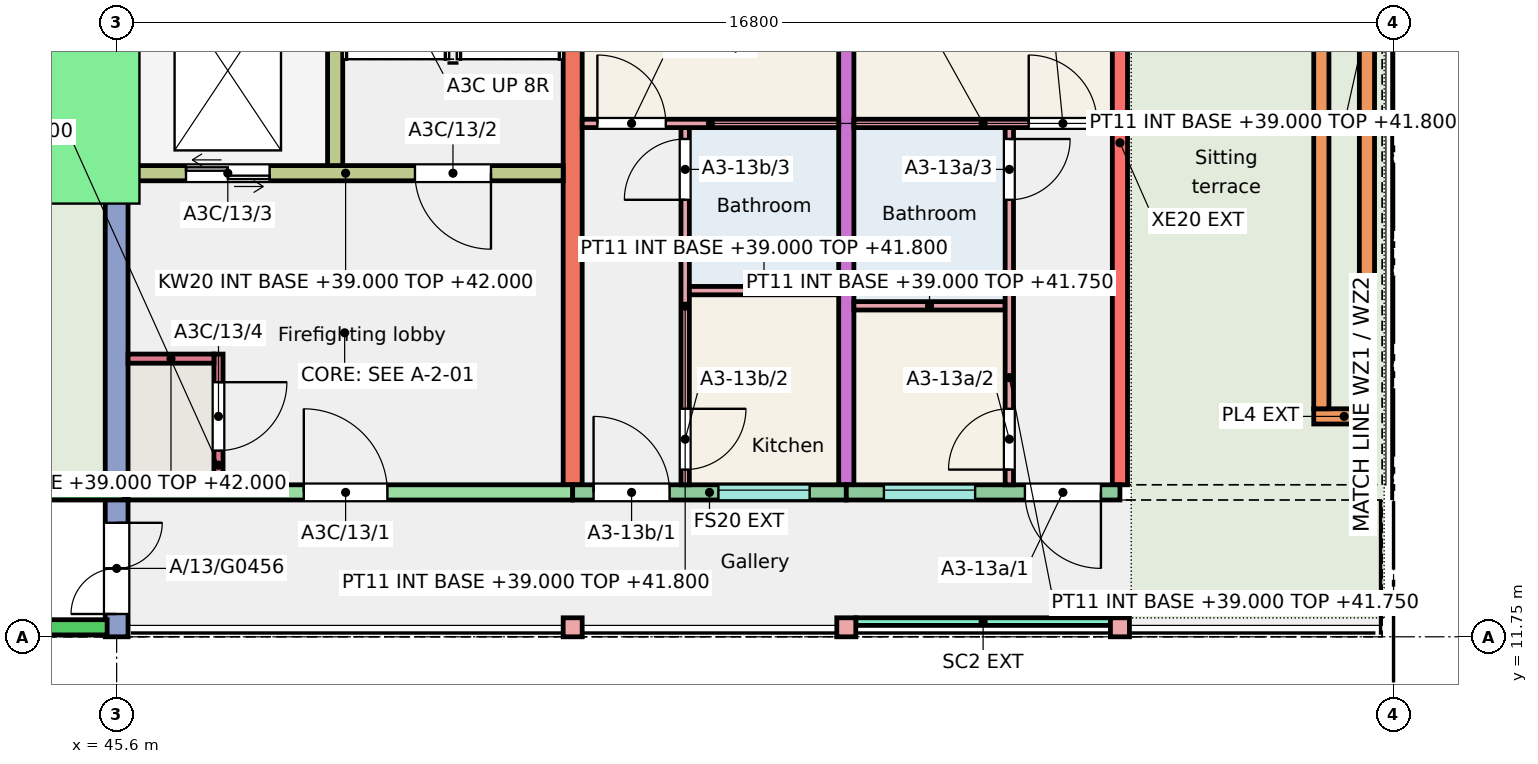
"""IFC4 building model, lengths in metres.
Left out: names, types, materials, properties, quantities, classifications, styles, units other than length and angle.
Written with IfcOpenShell. Run it as: python <this file> out.ifc"""

import sys

from ifc_helpers import new_model, si_unit, direction, frame, frame_2d, origin, origin_2d, place, context, subcontext, project, spatial, rectangle, extrude, element, fill, save


model = new_model("IFC4")
c1 = context("Model", 3, precision=1e-05, world=origin(), true_north=direction((0.0, 1.0)))
c2 = subcontext(c1, "Body", "Model", "MODEL_VIEW")
j1 = project(units=[si_unit("LENGTHUNIT", "METRE"), si_unit("PLANEANGLEUNIT", "RADIAN")], contexts=[c1])
p1 = place(None, origin())
s1 = spatial("IfcSite", under=j1, at=p1, CompositionType="ELEMENT")
p2 = place(p1, origin())
s2 = spatial("IfcBuilding", under=s1, at=p2, CompositionType="ELEMENT")
p3 = place(p2, frame((0.0, 0.0, 39.0)))
s3 = spatial("IfcBuildingStorey", under=s2, at=p3, CompositionType="ELEMENT", Elevation=39.0)
p4 = place(p3, frame((45.6, 11.75, 0.0), z_axis=(0.0, 0.0, 1.0), x_axis=(0.0, 1.0, 0.0)))
e1 = element("IfcWall", 1, at=p4, inside=s3, PredefinedType="SHEAR", context=c2, shape_type="SweptSolid", body=[
    extrude(rectangle(XDim=11.0, YDim=0.3, at=frame_2d((5.5, 0.0))), origin(), (0.0, 0.0, 1.0), 3.0),
])
p5 = place(p4, frame((0.3, 0.0, 0.0)))
e2 = element("IfcOpeningElement", 2, at=p5, cuts=e1, PredefinedType="OPENING", context=c2, shape_type="SweptSolid", body=[
    extrude(rectangle(XDim=1.2, YDim=2.1, at=frame_2d((0.6, 1.05))), frame((0.0, 0.16, 0.0), z_axis=(0.0, -1.0, 0.0), x_axis=(1.0, 0.0, 0.0)), (0.0, 0.0, 1.0), 0.32),
])
p6 = place(p3, frame((51.6, 13.75, 0.0), z_axis=(0.0, 0.0, 1.0), x_axis=(0.0, 1.0, 0.0)))
e3 = element("IfcWall", 3, at=p6, inside=s3, PredefinedType="SHEAR", context=c2, shape_type="SweptSolid", body=[
    extrude(rectangle(XDim=9.0, YDim=0.25, at=frame_2d((4.5, 0.0))), origin(), (0.0, 0.0, 1.0), 3.0),
])
p7 = place(p3, frame((55.2, 13.75, 0.0), z_axis=(0.0, 0.0, 1.0), x_axis=(0.0, 1.0, 0.0)))
e4 = element("IfcWall", 4, at=p7, inside=s3, PredefinedType="SHEAR", context=c2, shape_type="SweptSolid", body=[
    extrude(rectangle(XDim=9.0, YDim=0.2, at=frame_2d((4.5, 0.0))), origin(), (0.0, 0.0, 1.0), 3.0),
])
p8 = place(p3, frame((58.8, 13.75, 0.0), z_axis=(0.0, 0.0, 1.0), x_axis=(0.0, 1.0, 0.0)))
e5 = element("IfcWall", 5, at=p8, inside=s3, PredefinedType="SHEAR", context=c2, shape_type="SweptSolid", body=[
    extrude(rectangle(XDim=9.0, YDim=0.2, at=frame_2d((4.5, 0.0))), origin(), (0.0, 0.0, 1.0), 3.0),
])
p9 = place(p8, frame((7.653, 0.0, 0.9)))
e6 = element("IfcOpeningElement", 6, at=p9, cuts=e5, PredefinedType="OPENING", context=c2, shape_type="SweptSolid", body=[
    extrude(rectangle(XDim=1.2, YDim=1.5, at=frame_2d((0.6, 0.75))), frame((0.0, 0.11, 0.0), z_axis=(0.0, -1.0, 0.0), x_axis=(1.0, 0.0, 0.0)), (0.0, 0.0, 1.0), 0.22),
])
p10 = place(p8, frame((6.405, 0.0, 0.0)))
e7 = element("IfcOpeningElement", 7, at=p10, cuts=e5, PredefinedType="OPENING", context=c2, shape_type="SweptSolid", body=[
    extrude(rectangle(XDim=1.0, YDim=2.1, at=frame_2d((0.5, 1.05))), frame((0.0, 0.11, 0.0), z_axis=(0.0, -1.0, 0.0), x_axis=(1.0, 0.0, 0.0)), (0.0, 0.0, 1.0), 0.22),
])
p11 = place(p3, frame((45.75, 13.65, 0.0), z_axis=(0.0, 0.0, 1.0), x_axis=(1.0, 0.0, 0.0)))
e8 = element("IfcWall", 8, at=p11, inside=s3, PredefinedType="SHEAR", context=c2, shape_type="SweptSolid", body=[
    extrude(rectangle(XDim=5.85, YDim=0.2, at=frame_2d((2.925, 0.0))), origin(), (0.0, 0.0, 1.0), 3.0),
])
p12 = place(p11, frame((2.312, 0.0, 0.0)))
e9 = element("IfcOpeningElement", 9, at=p12, cuts=e8, PredefinedType="OPENING", context=c2, shape_type="SweptSolid", body=[
    extrude(rectangle(XDim=1.1, YDim=2.1, at=frame_2d((0.55, 1.05))), frame((0.0, 0.11, 0.0), z_axis=(0.0, -1.0, 0.0), x_axis=(1.0, 0.0, 0.0)), (0.0, 0.0, 1.0), 0.22),
])
p13 = place(p3, frame((45.75, 17.85, 0.0), z_axis=(0.0, 0.0, 1.0), x_axis=(1.0, 0.0, 0.0)))
e10 = element("IfcWall", 10, at=p13, inside=s3, PredefinedType="SHEAR", context=c2, shape_type="SweptSolid", body=[
    extrude(rectangle(XDim=5.725, YDim=0.2, at=frame_2d((2.863, 0.0))), origin(), (0.0, 0.0, 1.0), 3.0),
])
p14 = place(p13, frame((3.775, 0.0, 0.0)))
e11 = element("IfcOpeningElement", 11, at=p14, cuts=e10, PredefinedType="OPENING", context=c2, shape_type="SweptSolid", body=[
    extrude(rectangle(XDim=1.0, YDim=2.1, at=frame_2d((0.5, 1.05))), frame((0.0, 0.11, 0.0), z_axis=(0.0, -1.0, 0.0), x_axis=(1.0, 0.0, 0.0)), (0.0, 0.0, 1.0), 0.22),
])
p15 = place(p13, frame((0.762, 0.0, 0.0)))
e12 = element("IfcOpeningElement", 12, at=p15, cuts=e10, PredefinedType="OPENING", context=c2, shape_type="SweptSolid", body=[
    extrude(rectangle(XDim=1.1, YDim=2.1, at=frame_2d((0.55, 1.05))), frame((0.0, 0.11, 0.0), z_axis=(0.0, -1.0, 0.0), x_axis=(1.0, 0.0, 0.0)), (0.0, 0.0, 1.0), 0.22),
])
p16 = place(p3, frame((48.475, 17.95, 0.0), z_axis=(0.0, 0.0, 1.0), x_axis=(0.0, 1.0, 0.0)))
e13 = element("IfcWall", 13, at=p16, inside=s3, PredefinedType="SHEAR", context=c2, shape_type="SweptSolid", body=[
    extrude(rectangle(XDim=4.8, YDim=0.2, at=frame_2d((2.4, 0.0))), origin(), (0.0, 0.0, 1.0), 3.0),
])
p17 = place(p3, frame((46.94, 13.75, 0.0), z_axis=(0.0, 0.0, 1.0), x_axis=(0.0, 1.0, 0.0)))
e14 = element("IfcWall", 14, at=p17, inside=s3, PredefinedType="SHEAR", context=c2, shape_type="SweptSolid", body=[
    extrude(rectangle(XDim=1.72, YDim=0.12, at=frame_2d((0.86, 0.0))), origin(), (0.0, 0.0, 1.0), 3.0),
])
p18 = place(p17, frame((0.45, 0.0, 0.0)))
e15 = element("IfcOpeningElement", 15, at=p18, cuts=e14, PredefinedType="OPENING", context=c2, shape_type="SweptSolid", body=[
    extrude(rectangle(XDim=0.9, YDim=2.1, at=frame_2d((0.45, 1.05))), frame((0.0, 0.07, 0.0), z_axis=(0.0, -1.0, 0.0), x_axis=(1.0, 0.0, 0.0)), (0.0, 0.0, 1.0), 0.14),
])
p19 = place(p3, frame((45.75, 15.41, 0.0), z_axis=(0.0, 0.0, 1.0), x_axis=(1.0, 0.0, 0.0)))
e16 = element("IfcWall", 16, at=p19, inside=s3, PredefinedType="SHEAR", context=c2, shape_type="SweptSolid", body=[
    extrude(rectangle(XDim=1.13, YDim=0.12, at=frame_2d((0.565, 0.0))), origin(), (0.0, 0.0, 1.0), 3.0),
])
p20 = place(p3, frame((51.6, 13.65, 0.0), z_axis=(0.0, 0.0, 1.0), x_axis=(1.0, 0.0, 0.0)))
e17 = element("IfcWall", 17, at=p20, inside=s3, PredefinedType="SOLIDWALL", context=c2, shape_type="SweptSolid", body=[
    extrude(rectangle(XDim=3.6, YDim=0.2, at=frame_2d((1.8, 0.0))), origin(), (0.0, 0.0, 1.0), 3.0),
])
p21 = place(p20, frame((1.917, 0.0, 1.1)))
e18 = element("IfcOpeningElement", 18, at=p21, cuts=e17, PredefinedType="OPENING", context=c2, shape_type="SweptSolid", body=[
    extrude(rectangle(XDim=1.2, YDim=1.3, at=frame_2d((0.6, 0.65))), frame((0.0, 0.11, 0.0), z_axis=(0.0, -1.0, 0.0), x_axis=(1.0, 0.0, 0.0)), (0.0, 0.0, 1.0), 0.22),
])
p22 = place(p20, frame((0.275, 0.0, 0.0)))
e19 = element("IfcOpeningElement", 19, at=p22, cuts=e17, PredefinedType="OPENING", context=c2, shape_type="SweptSolid", body=[
    extrude(rectangle(XDim=1.0, YDim=2.1, at=frame_2d((0.5, 1.05))), frame((0.0, 0.11, 0.0), z_axis=(0.0, -1.0, 0.0), x_axis=(1.0, 0.0, 0.0)), (0.0, 0.0, 1.0), 0.22),
])
p23 = place(p3, frame((55.2, 13.65, 0.0), z_axis=(0.0, 0.0, 1.0), x_axis=(1.0, 0.0, 0.0)))
e20 = element("IfcWall", 20, at=p23, inside=s3, PredefinedType="SOLIDWALL", context=c2, shape_type="SweptSolid", body=[
    extrude(rectangle(XDim=3.6, YDim=0.2, at=frame_2d((1.8, 0.0))), origin(), (0.0, 0.0, 1.0), 3.0),
])
p24 = place(p23, frame((0.495, 0.0, 1.1)))
e21 = element("IfcOpeningElement", 21, at=p24, cuts=e20, PredefinedType="OPENING", context=c2, shape_type="SweptSolid", body=[
    extrude(rectangle(XDim=1.2, YDim=1.3, at=frame_2d((0.6, 0.65))), frame((0.0, 0.11, 0.0), z_axis=(0.0, -1.0, 0.0), x_axis=(1.0, 0.0, 0.0)), (0.0, 0.0, 1.0), 0.22),
])
p25 = place(p23, frame((2.35, 0.0, 0.0)))
e22 = element("IfcOpeningElement", 22, at=p25, cuts=e20, PredefinedType="OPENING", context=c2, shape_type="SweptSolid", body=[
    extrude(rectangle(XDim=1.0, YDim=2.1, at=frame_2d((0.5, 1.05))), frame((0.0, 0.11, 0.0), z_axis=(0.0, -1.0, 0.0), x_axis=(1.0, 0.0, 0.0)), (0.0, 0.0, 1.0), 0.22),
])
for number, where, z_axis, x_axis in (
    (23, (51.6, 11.875, 0.0), (0.0, 0.0, 1.0), (1.0, 0.0, 0.0)),
    (24, (55.2, 11.875, 0.0), (0.0, 0.0, 1.0), (1.0, 0.0, 0.0)),
    (25, (58.8, 11.875, 0.0), (0.0, 0.0, 1.0), (1.0, 0.0, 0.0)),
):
    element("IfcColumn", number, at=place(p3, frame(where, z_axis=z_axis, x_axis=x_axis)), inside=s3, PredefinedType="COLUMN", context=c2, shape_type="SweptSolid", body=[
        extrude(rectangle(XDim=0.25, YDim=0.25, at=origin_2d()), origin(), (0.0, 0.0, 1.0), 3.0),
    ])
p26 = place(p3, frame((42.625, 17.85, 0.0), z_axis=(0.0, 0.0, 1.0), x_axis=(1.0, 0.0, 0.0)))
e26 = element("IfcWall", 26, at=p26, inside=s3, PredefinedType="SHEAR", context=c2, shape_type="SweptSolid", body=[
    extrude(rectangle(XDim=2.825, YDim=0.2, at=frame_2d((1.413, 0.0))), origin(), (0.0, 0.0, 1.0), 1.5),
])
p27 = place(p3, frame((39.5, 13.65, 0.0), z_axis=(0.0, 0.0, 1.0), x_axis=(1.0, 0.0, 0.0)))
e27 = element("IfcWall", 27, at=p27, inside=s3, PredefinedType="PARAPET", context=c2, shape_type="SweptSolid", body=[
    extrude(rectangle(XDim=6.2, YDim=0.2, at=frame_2d((3.1, 0.0))), origin(), (0.0, 0.0, 1.0), 1.1),
])
p28 = place(p3, frame((39.725, 11.875, 0.0), z_axis=(0.0, 0.0, 1.0), x_axis=(1.0, 0.0, 0.0)))
e28 = element("IfcWall", 28, at=p28, inside=s3, PredefinedType="PARAPET", context=c2, shape_type="SweptSolid", body=[
    extrude(rectangle(XDim=5.75, YDim=0.2, at=frame_2d((2.875, 0.0))), origin(), (0.0, 0.0, 1.0), 1.1),
])
p29 = place(p3, frame((61.35, 14.65, 0.01), z_axis=(0.0, 0.0, 1.0), x_axis=(1.0, 0.0, 0.0)))
e29 = element("IfcWall", 29, at=p29, inside=s3, PredefinedType="SOLIDWALL", context=c2, shape_type="SweptSolid", body=[
    extrude(rectangle(XDim=0.8, YDim=0.2, at=frame_2d((0.4, 0.0))), origin(), (0.0, 0.0, 1.0), 0.45),
])
for number, where, z_axis, x_axis in (
    (30, (61.45, 14.75, 0.01), (0.0, 0.0, 1.0), (0.0, 1.0, 0.0)),
    (31, (62.05, 14.75, 0.01), (0.0, 0.0, 1.0), (0.0, 1.0, 0.0)),
):
    element("IfcWall", number, at=place(p3, frame(where, z_axis=z_axis, x_axis=x_axis)), inside=s3, PredefinedType="SOLIDWALL", context=c2, shape_type="SweptSolid", body=[
        extrude(rectangle(XDim=7.5, YDim=0.2, at=frame_2d((3.75, 0.0))), origin(), (0.0, 0.0, 1.0), 0.45),
    ])
p30 = place(p3, frame((55.325, 11.95, 0.0), z_axis=(0.0, 0.0, 1.0), x_axis=(1.0, 0.0, 0.0)))
e32 = element("IfcWall", 32, at=p30, inside=s3, PredefinedType="SOLIDWALL", context=c2, shape_type="SweptSolid", body=[
    extrude(rectangle(XDim=3.35, YDim=0.1, at=frame_2d((1.675, 0.0))), origin(), (0.0, 0.0, 1.0), 2.45),
])
p31 = place(p3, frame((55.3, 16.105, 0.0), z_axis=(0.0, 0.0, 1.0), x_axis=(1.0, 0.0, 0.0)))
e33 = element("IfcWall", 33, at=p31, inside=s3, PredefinedType="PARTITIONING", context=c2, shape_type="SweptSolid", body=[
    extrude(rectangle(XDim=1.99, YDim=0.11, at=frame_2d((0.995, 0.0))), origin(), (0.0, 0.0, 1.0), 2.75),
])
p32 = place(p3, frame((57.345, 13.75, 0.0), z_axis=(0.0, 0.0, 1.0), x_axis=(0.0, 1.0, 0.0)))
e34 = element("IfcWall", 34, at=p32, inside=s3, PredefinedType="PARTITIONING", context=c2, shape_type="SweptSolid", body=[
    extrude(rectangle(XDim=4.7, YDim=0.11, at=frame_2d((2.35, 0.0))), origin(), (0.0, 0.0, 1.0), 2.75),
])
p33 = place(p32, frame((0.2, 0.0, 0.0)))
e35 = element("IfcOpeningElement", 35, at=p33, cuts=e34, PredefinedType="OPENING", context=c2, shape_type="SweptSolid", body=[
    extrude(rectangle(XDim=0.8, YDim=2.1, at=frame_2d((0.4, 1.05))), frame((0.0, 0.065, 0.0), z_axis=(0.0, -1.0, 0.0), x_axis=(1.0, 0.0, 0.0)), (0.0, 0.0, 1.0), 0.13),
])
p34 = place(p32, frame((3.75, 0.0, 0.0)))
e36 = element("IfcOpeningElement", 36, at=p34, cuts=e34, PredefinedType="OPENING", context=c2, shape_type="SweptSolid", body=[
    extrude(rectangle(XDim=0.8, YDim=2.1, at=frame_2d((0.4, 1.05))), frame((0.0, 0.065, 0.0), z_axis=(0.0, -1.0, 0.0), x_axis=(1.0, 0.0, 0.0)), (0.0, 0.0, 1.0), 0.13),
])
p35 = place(p3, frame((55.3, 18.505, 0.0), z_axis=(0.0, 0.0, 1.0), x_axis=(1.0, 0.0, 0.0)))
e37 = element("IfcWall", 37, at=p35, inside=s3, PredefinedType="PARTITIONING", context=c2, shape_type="SweptSolid", body=[
    extrude(rectangle(XDim=3.4, YDim=0.11, at=frame_2d((1.7, 0.0))), origin(), (0.0, 0.0, 1.0), 2.75),
])
p36 = place(p35, frame((2.3, 0.0, 0.0)))
e38 = element("IfcOpeningElement", 38, at=p36, cuts=e37, PredefinedType="OPENING", context=c2, shape_type="SweptSolid", body=[
    extrude(rectangle(XDim=0.9, YDim=2.1, at=frame_2d((0.45, 1.05))), frame((0.0, 0.065, 0.0), z_axis=(0.0, -1.0, 0.0), x_axis=(1.0, 0.0, 0.0)), (0.0, 0.0, 1.0), 0.13),
])
p37 = place(p3, frame((53.08, 13.75, 0.0), z_axis=(0.0, 0.0, 1.0), x_axis=(0.0, 1.0, 0.0)))
e39 = element("IfcWall", 39, at=p37, inside=s3, PredefinedType="PARTITIONING", context=c2, shape_type="SweptSolid", body=[
    extrude(rectangle(XDim=4.7, YDim=0.11, at=frame_2d((2.35, 0.0))), origin(), (0.0, 0.0, 1.0), 2.8),
])
p38 = place(p37, frame((0.2, 0.0, 0.0)))
e40 = element("IfcOpeningElement", 40, at=p38, cuts=e39, PredefinedType="OPENING", context=c2, shape_type="SweptSolid", body=[
    extrude(rectangle(XDim=0.8, YDim=2.1, at=frame_2d((0.4, 1.05))), frame((0.0, 0.065, 0.0), z_axis=(0.0, -1.0, 0.0), x_axis=(1.0, 0.0, 0.0)), (0.0, 0.0, 1.0), 0.13),
])
p39 = place(p37, frame((3.75, 0.0, 0.0)))
e41 = element("IfcOpeningElement", 41, at=p39, cuts=e39, PredefinedType="OPENING", context=c2, shape_type="SweptSolid", body=[
    extrude(rectangle(XDim=0.8, YDim=2.1, at=frame_2d((0.4, 1.05))), frame((0.0, 0.065, 0.0), z_axis=(0.0, -1.0, 0.0), x_axis=(1.0, 0.0, 0.0)), (0.0, 0.0, 1.0), 0.13),
])
p40 = place(p3, frame((53.135, 16.305, 0.0), z_axis=(0.0, 0.0, 1.0), x_axis=(1.0, 0.0, 0.0)))
e42 = element("IfcWall", 42, at=p40, inside=s3, PredefinedType="PARTITIONING", context=c2, shape_type="SweptSolid", body=[
    extrude(rectangle(XDim=1.965, YDim=0.11, at=frame_2d((0.982, 0.0))), origin(), (0.0, 0.0, 1.0), 2.8),
])
p41 = place(p3, frame((51.725, 18.505, 0.0), z_axis=(0.0, 0.0, 1.0), x_axis=(1.0, 0.0, 0.0)))
e43 = element("IfcWall", 43, at=p41, inside=s3, PredefinedType="PARTITIONING", context=c2, shape_type="SweptSolid", body=[
    extrude(rectangle(XDim=3.375, YDim=0.11, at=frame_2d((1.688, 0.0))), origin(), (0.0, 0.0, 1.0), 2.8),
])
p42 = place(p41, frame((0.2, 0.0, 0.0)))
e44 = element("IfcOpeningElement", 44, at=p42, cuts=e43, PredefinedType="OPENING", context=c2, shape_type="SweptSolid", body=[
    extrude(rectangle(XDim=0.9, YDim=2.1, at=frame_2d((0.45, 1.05))), frame((0.0, 0.065, 0.0), z_axis=(0.0, -1.0, 0.0), x_axis=(1.0, 0.0, 0.0)), (0.0, 0.0, 1.0), 0.13),
])
p43 = place(p24, origin())
e45 = element("IfcWindow", 45, at=p43, inside=s3, PartitioningType="SINGLE_PANEL", PredefinedType="WINDOW", context=c2, shape_type="SweptSolid", body=[
    extrude(rectangle(XDim=1.2, YDim=1.3, at=frame_2d((0.6, 0.65))), frame((0.0, 0.06, 0.0), z_axis=(0.0, -1.0, 0.0), x_axis=(1.0, 0.0, 0.0)), (0.0, 0.0, 1.0), 0.06),
])
fill(e21, e45)
p44 = place(p21, origin())
e46 = element("IfcWindow", 46, at=p44, inside=s3, PartitioningType="SINGLE_PANEL", PredefinedType="WINDOW", context=c2, shape_type="SweptSolid", body=[
    extrude(rectangle(XDim=1.2, YDim=1.3, at=frame_2d((0.6, 0.65))), frame((0.0, 0.06, 0.0), z_axis=(0.0, -1.0, 0.0), x_axis=(1.0, 0.0, 0.0)), (0.0, 0.0, 1.0), 0.06),
])
fill(e18, e46)
p45 = place(p25, origin())
e47 = element("IfcDoor", 47, at=p45, inside=s3, OperationType="SINGLE_SWING_RIGHT", PredefinedType="DOOR", context=c2, shape_type="SweptSolid", body=[
    extrude(rectangle(XDim=1.0, YDim=2.1, at=frame_2d((0.5, 1.05))), frame((0.0, 0.025, 0.0), z_axis=(0.0, -1.0, 0.0), x_axis=(1.0, 0.0, 0.0)), (0.0, 0.0, 1.0), 0.05),
])
fill(e22, e47)
p46 = place(p33, origin())
e48 = element("IfcDoor", 48, at=p46, inside=s3, OperationType="SINGLE_SWING_LEFT", PredefinedType="DOOR", context=c2, shape_type="SweptSolid", body=[
    extrude(rectangle(XDim=0.8, YDim=2.1, at=frame_2d((0.4, 1.05))), frame((0.0, 0.025, 0.0), z_axis=(0.0, -1.0, 0.0), x_axis=(1.0, 0.0, 0.0)), (0.0, 0.0, 1.0), 0.05),
])
fill(e35, e48)
p47 = place(p34, origin())
e49 = element("IfcDoor", 49, at=p47, inside=s3, OperationType="SINGLE_SWING_RIGHT", PredefinedType="DOOR", context=c2, shape_type="SweptSolid", body=[
    extrude(rectangle(XDim=0.8, YDim=2.1, at=frame_2d((0.4, 1.05))), frame((0.0, 0.025, 0.0), z_axis=(0.0, -1.0, 0.0), x_axis=(1.0, 0.0, 0.0)), (0.0, 0.0, 1.0), 0.05),
])
fill(e36, e49)
p48 = place(p36, origin())
e50 = element("IfcDoor", 50, at=p48, inside=s3, OperationType="SINGLE_SWING_LEFT", PredefinedType="DOOR", context=c2, shape_type="SweptSolid", body=[
    extrude(rectangle(XDim=0.9, YDim=2.1, at=frame_2d((0.45, 1.05))), frame((0.0, 0.025, 0.0), z_axis=(0.0, -1.0, 0.0), x_axis=(1.0, 0.0, 0.0)), (0.0, 0.0, 1.0), 0.05),
])
fill(e38, e50)
p49 = place(p22, origin())
e51 = element("IfcDoor", 51, at=p49, inside=s3, OperationType="SINGLE_SWING_LEFT", PredefinedType="DOOR", context=c2, shape_type="SweptSolid", body=[
    extrude(rectangle(XDim=1.0, YDim=2.1, at=frame_2d((0.5, 1.05))), frame((0.0, 0.025, 0.0), z_axis=(0.0, -1.0, 0.0), x_axis=(1.0, 0.0, 0.0)), (0.0, 0.0, 1.0), 0.05),
])
fill(e19, e51)
p50 = place(p38, origin())
e52 = element("IfcDoor", 52, at=p50, inside=s3, OperationType="SINGLE_SWING_RIGHT", PredefinedType="DOOR", context=c2, shape_type="SweptSolid", body=[
    extrude(rectangle(XDim=0.8, YDim=2.1, at=frame_2d((0.4, 1.05))), frame((0.0, 0.025, 0.0), z_axis=(0.0, -1.0, 0.0), x_axis=(1.0, 0.0, 0.0)), (0.0, 0.0, 1.0), 0.05),
])
fill(e40, e52)
p51 = place(p39, origin())
e53 = element("IfcDoor", 53, at=p51, inside=s3, OperationType="SINGLE_SWING_LEFT", PredefinedType="DOOR", context=c2, shape_type="SweptSolid", body=[
    extrude(rectangle(XDim=0.8, YDim=2.1, at=frame_2d((0.4, 1.05))), frame((0.0, 0.025, 0.0), z_axis=(0.0, -1.0, 0.0), x_axis=(1.0, 0.0, 0.0)), (0.0, 0.0, 1.0), 0.05),
])
fill(e41, e53)
p52 = place(p42, origin())
e54 = element("IfcDoor", 54, at=p52, inside=s3, OperationType="SINGLE_SWING_LEFT", PredefinedType="DOOR", context=c2, shape_type="SweptSolid", body=[
    extrude(rectangle(XDim=0.9, YDim=2.1, at=frame_2d((0.45, 1.05))), frame((0.0, 0.025, 0.0), z_axis=(0.0, -1.0, 0.0), x_axis=(1.0, 0.0, 0.0)), (0.0, 0.0, 1.0), 0.05),
])
fill(e44, e54)
p53 = place(p12, origin())
e55 = element("IfcDoor", 55, at=p53, inside=s3, OperationType="SINGLE_SWING_LEFT", PredefinedType="DOOR", context=c2, shape_type="SweptSolid", body=[
    extrude(rectangle(XDim=1.1, YDim=2.1, at=frame_2d((0.55, 1.05))), frame((0.0, 0.025, 0.0), z_axis=(0.0, -1.0, 0.0), x_axis=(1.0, 0.0, 0.0)), (0.0, 0.0, 1.0), 0.05),
])
fill(e9, e55)
p54 = place(p14, origin())
e56 = element("IfcDoor", 56, at=p54, inside=s3, OperationType="SINGLE_SWING_RIGHT", PredefinedType="DOOR", context=c2, shape_type="SweptSolid", body=[
    extrude(rectangle(XDim=1.0, YDim=2.1, at=frame_2d((0.5, 1.05))), frame((0.0, 0.025, 0.0), z_axis=(0.0, -1.0, 0.0), x_axis=(1.0, 0.0, 0.0)), (0.0, 0.0, 1.0), 0.05),
])
fill(e11, e56)
p55 = place(p15, origin())
e57 = element("IfcDoor", 57, at=p55, inside=s3, OperationType="DOUBLE_DOOR_SLIDING", PredefinedType="DOOR", context=c2, shape_type="SweptSolid", body=[
    extrude(rectangle(XDim=1.1, YDim=2.1, at=frame_2d((0.55, 1.05))), frame((0.0, 0.025, 0.0), z_axis=(0.0, -1.0, 0.0), x_axis=(1.0, 0.0, 0.0)), (0.0, 0.0, 1.0), 0.05),
])
fill(e12, e57)
p56 = place(p18, origin())
e58 = element("IfcDoor", 58, at=p56, inside=s3, OperationType="SINGLE_SWING_RIGHT", PredefinedType="DOOR", context=c2, shape_type="SweptSolid", body=[
    extrude(rectangle(XDim=0.9, YDim=2.1, at=frame_2d((0.45, 1.05))), frame((0.0, 0.025, 0.0), z_axis=(0.0, -1.0, 0.0), x_axis=(1.0, 0.0, 0.0)), (0.0, 0.0, 1.0), 0.05),
])
fill(e15, e58)
p57 = place(p5, origin())
e59 = element("IfcDoor", 59, at=p57, inside=s3, OperationType="DOUBLE_DOOR_SINGLE_SWING", PredefinedType="DOOR", context=c2, shape_type="SweptSolid", body=[
    extrude(rectangle(XDim=1.2, YDim=2.1, at=frame_2d((0.6, 1.05))), frame((0.0, 0.025, 0.0), z_axis=(0.0, -1.0, 0.0), x_axis=(1.0, 0.0, 0.0)), (0.0, 0.0, 1.0), 0.05),
])
fill(e2, e59)
save(model, sys.argv[1])
